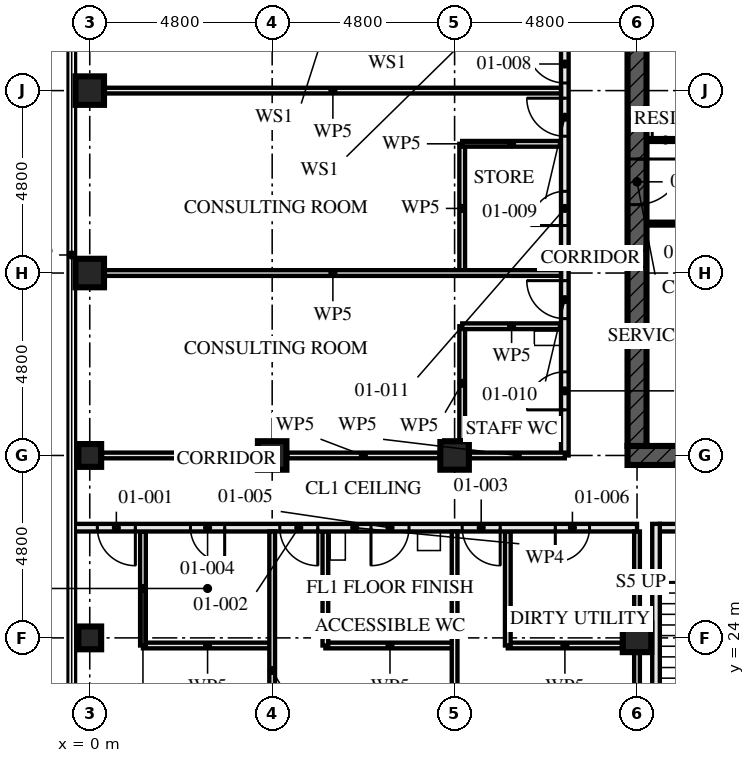
"""IFC4 building model, lengths in metres.
Left out: names, types, materials, properties, quantities, classifications, styles, units other than length and angle.
Written with IfcOpenShell. Run it as: python <this file> out.ifc"""

import sys

from ifc_helpers import new_model, si_unit, direction, frame, frame_2d, origin, origin_2d, place, context, subcontext, project, spatial, rectangle, hollow_rectangle, extrude, element, fill, save


model = new_model("IFC4")
c1 = context("Model", 3, precision=1e-05, world=origin(), true_north=direction((0.0, 1.0)))
c2 = subcontext(c1, "Body", "Model", "MODEL_VIEW")
j1 = project(units=[si_unit("LENGTHUNIT", "METRE"), si_unit("PLANEANGLEUNIT", "RADIAN")], contexts=[c1])
p1 = place(None, origin())
s1 = spatial("IfcSite", under=j1, at=p1, CompositionType="ELEMENT")
p2 = place(p1, origin())
s2 = spatial("IfcBuilding", under=s1, at=p2, CompositionType="ELEMENT")
p3 = place(p2, frame((0.0, 0.0, 4.5)))
s3 = spatial("IfcBuildingStorey", under=s2, at=p3, CompositionType="ELEMENT", Elevation=4.5)
for number, where, z_axis, x_axis in (
    (1, (0.0, 24.0, 0.0), (0.0, 0.0, 1.0), (1.0, 0.0, 0.0)),
    (2, (0.0, 28.8, 0.0), (0.0, 0.0, 1.0), (0.0, 1.0, 0.0)),
):
    element("IfcColumn", number, at=place(p3, frame(where, z_axis=z_axis, x_axis=x_axis)), inside=s3, PredefinedType="COLUMN", context=c2, shape_type="SweptSolid", body=[
        extrude(hollow_rectangle(XDim=0.6, YDim=0.6, WallThickness=0.08, at=origin_2d()), origin(), (0.0, 0.0, 1.0), 4.5),
    ])
for number, where, z_axis, x_axis in (
    (3, (0.0, 33.6, 0.0), (0.0, 0.0, 1.0), (1.0, 0.0, 0.0)),
    (4, (0.0, 38.4, 0.0), (0.0, 0.0, 1.0), (1.0, 0.0, 0.0)),
    (5, (4.8, 28.8, 0.0), (0.0, 0.0, 1.0), (0.0, 1.0, 0.0)),
    (6, (9.6, 28.8, 0.0), (0.0, 0.0, 1.0), (0.0, 1.0, 0.0)),
    (7, (14.4, 24.0, 0.0), (0.0, 0.0, 1.0), (1.0, 0.0, 0.0)),
):
    element("IfcColumn", number, at=place(p3, frame(where, z_axis=z_axis, x_axis=x_axis)), inside=s3, PredefinedType="COLUMN", context=c2, shape_type="SweptSolid", body=[
        extrude(hollow_rectangle(XDim=0.75, YDim=0.75, WallThickness=0.08, at=origin_2d()), origin(), (0.0, 0.0, 1.0), 4.5),
    ])
p4 = place(p3, frame((14.15, 28.8, -0.17), z_axis=(0.0, 0.0, 1.0), x_axis=(1.0, 0.0, 0.0)))
e8 = element("IfcWall", 8, at=p4, inside=s3, PredefinedType="SHEAR", context=c2, shape_type="SweptSolid", body=[
    extrude(rectangle(XDim=14.9, YDim=0.5, at=frame_2d((7.45, 0.0))), origin(), (0.0, 0.0, 1.0), 4.5),
])
p5 = place(p4, frame((6.85, 0.0, 0.17)))
e9 = element("IfcOpeningElement", 9, at=p5, cuts=e8, PredefinedType="OPENING", context=c2, shape_type="SweptSolid", body=[
    extrude(rectangle(XDim=1.2, YDim=2.1, at=frame_2d((0.6, 1.05))), frame((0.0, 0.26, 0.0), z_axis=(0.0, -1.0, 0.0), x_axis=(1.0, 0.0, 0.0)), (0.0, 0.0, 1.0), 0.521),
])
p6 = place(p3, frame((14.4, 42.95, -0.17), z_axis=(0.0, 0.0, 1.0), x_axis=(0.0, -1.0, 0.0)))
e10 = element("IfcWall", 10, at=p6, inside=s3, PredefinedType="SHEAR", context=c2, shape_type="SweptSolid", body=[
    extrude(rectangle(XDim=13.9, YDim=0.5, at=frame_2d((6.95, 0.0))), origin(), (0.0, 0.0, 1.0), 4.5),
])
p7 = place(p6, frame((6.35, 0.0, 0.17)))
e11 = element("IfcOpeningElement", 11, at=p7, cuts=e10, PredefinedType="OPENING", context=c2, shape_type="SweptSolid", body=[
    extrude(rectangle(XDim=1.2, YDim=2.1, at=frame_2d((0.6, 1.05))), frame((0.0, 0.26, 0.0), z_axis=(0.0, -1.0, 0.0), x_axis=(1.0, 0.0, 0.0)), (0.0, 0.0, 1.0), 0.521),
])
p8 = place(p3, frame((1.4, 23.8, 0.0), z_axis=(0.0, 0.0, 1.0), x_axis=(0.0, 1.0, 0.0)))
e12 = element("IfcWall", 12, at=p8, inside=s3, PredefinedType="PARTITIONING", context=c2, shape_type="SweptSolid", body=[
    extrude(rectangle(XDim=3.0, YDim=0.15, at=frame_2d((1.5, 0.0))), origin(), (0.0, 0.0, 1.0), 3.55),
])
p9 = place(p3, frame((1.4, 23.8, 0.0), z_axis=(0.0, 0.0, 1.0), x_axis=(1.0, 0.0, 0.0)))
e13 = element("IfcWall", 13, at=p9, inside=s3, PredefinedType="PARTITIONING", context=c2, shape_type="SweptSolid", body=[
    extrude(rectangle(XDim=3.4, YDim=0.15, at=frame_2d((1.7, 0.0))), origin(), (0.0, 0.0, 1.0), 4.33),
])
p10 = place(p3, frame((6.2, 23.8, 0.0), z_axis=(0.0, 0.0, 1.0), x_axis=(0.0, 1.0, 0.0)))
e14 = element("IfcWall", 14, at=p10, inside=s3, PredefinedType="PARTITIONING", context=c2, shape_type="SweptSolid", body=[
    extrude(rectangle(XDim=3.0, YDim=0.15, at=frame_2d((1.5, 0.0))), origin(), (0.0, 0.0, 1.0), 3.55),
])
p11 = place(p3, frame((6.2, 23.8, 0.0), z_axis=(0.0, 0.0, 1.0), x_axis=(1.0, 0.0, 0.0)))
e15 = element("IfcWall", 15, at=p11, inside=s3, PredefinedType="PARTITIONING", context=c2, shape_type="SweptSolid", body=[
    extrude(rectangle(XDim=3.4, YDim=0.15, at=frame_2d((1.7, 0.0))), origin(), (0.0, 0.0, 1.0), 4.33),
])
p12 = place(p3, frame((11.0, 23.8, 0.0), z_axis=(0.0, 0.0, 1.0), x_axis=(0.0, 1.0, 0.0)))
e16 = element("IfcWall", 16, at=p12, inside=s3, PredefinedType="PARTITIONING", context=c2, shape_type="SweptSolid", body=[
    extrude(rectangle(XDim=3.0, YDim=0.15, at=frame_2d((1.5, 0.0))), origin(), (0.0, 0.0, 1.0), 3.55),
])
p13 = place(p3, frame((11.0, 23.8, 0.0), z_axis=(0.0, 0.0, 1.0), x_axis=(1.0, 0.0, 0.0)))
e17 = element("IfcWall", 17, at=p13, inside=s3, PredefinedType="PARTITIONING", context=c2, shape_type="SweptSolid", body=[
    extrude(rectangle(XDim=3.005, YDim=0.15, at=frame_2d((1.502, 0.0))), origin(), (0.0, 0.0, 1.0), 4.33),
])
p14 = place(p3, frame((4.8, 19.486, 0.0), z_axis=(0.0, 0.0, 1.0), x_axis=(0.0, 1.0, 0.0)))
e18 = element("IfcWall", 18, at=p14, inside=s3, PredefinedType="PARTITIONING", context=c2, shape_type="SweptSolid", body=[
    extrude(rectangle(XDim=7.314, YDim=0.15, at=frame_2d((3.657, 0.0))), origin(), (0.0, 0.0, 1.0), 3.55),
])
p15 = place(p3, frame((9.6, 14.686, 0.0), z_axis=(0.0, 0.0, 1.0), x_axis=(0.0, 1.0, 0.0)))
e19 = element("IfcWall", 19, at=p15, inside=s3, PredefinedType="PARTITIONING", context=c2, shape_type="SweptSolid", body=[
    extrude(rectangle(XDim=12.115, YDim=0.15, at=frame_2d((6.057, 0.0))), origin(), (0.0, 0.0, 1.0), 3.55),
])
p16 = place(p3, frame((-0.455, 26.9, 0.0), z_axis=(0.0, 0.0, 1.0), x_axis=(1.0, 0.0, 0.0)))
e20 = element("IfcWall", 20, at=p16, inside=s3, PredefinedType="PARTITIONING", context=c2, shape_type="SweptSolid", body=[
    extrude(rectangle(XDim=14.855, YDim=0.2, at=frame_2d((7.427, 0.0))), origin(), (0.0, 0.0, 1.0), 3.32),
])
p17 = place(p16, frame((0.655, 0.0, 0.0)))
e21 = element("IfcOpeningElement", 21, at=p17, cuts=e20, PredefinedType="OPENING", context=c2, shape_type="SweptSolid", body=[
    extrude(rectangle(XDim=1.0, YDim=2.4, at=frame_2d((0.5, 1.2))), frame((0.0, 0.111, 0.0), z_axis=(0.0, -1.0, 0.0), x_axis=(1.0, 0.0, 0.0)), (0.0, 0.0, 1.0), 0.221),
])
p18 = place(p16, frame((5.455, 0.0, 0.0)))
e22 = element("IfcOpeningElement", 22, at=p18, cuts=e20, PredefinedType="OPENING", context=c2, shape_type="SweptSolid", body=[
    extrude(rectangle(XDim=1.0, YDim=2.4, at=frame_2d((0.5, 1.2))), frame((0.0, 0.111, 0.0), z_axis=(0.0, -1.0, 0.0), x_axis=(1.0, 0.0, 0.0)), (0.0, 0.0, 1.0), 0.221),
])
p19 = place(p16, frame((10.255, 0.0, 0.0)))
e23 = element("IfcOpeningElement", 23, at=p19, cuts=e20, PredefinedType="OPENING", context=c2, shape_type="SweptSolid", body=[
    extrude(rectangle(XDim=1.0, YDim=2.4, at=frame_2d((0.5, 1.2))), frame((0.0, 0.111, 0.0), z_axis=(0.0, -1.0, 0.0), x_axis=(1.0, 0.0, 0.0)), (0.0, 0.0, 1.0), 0.221),
])
p20 = place(p16, frame((3.105, 0.0, 0.0)))
e24 = element("IfcOpeningElement", 24, at=p20, cuts=e20, PredefinedType="OPENING", context=c2, shape_type="SweptSolid", body=[
    extrude(rectangle(XDim=0.9, YDim=2.1, at=frame_2d((0.45, 1.05))), frame((0.0, 0.111, 0.0), z_axis=(0.0, -1.0, 0.0), x_axis=(1.0, 0.0, 0.0)), (0.0, 0.0, 1.0), 0.221),
])
p21 = place(p16, frame((7.855, 0.0, 0.0)))
e25 = element("IfcOpeningElement", 25, at=p21, cuts=e20, PredefinedType="OPENING", context=c2, shape_type="SweptSolid", body=[
    extrude(rectangle(XDim=1.0, YDim=2.1, at=frame_2d((0.5, 1.05))), frame((0.0, 0.111, 0.0), z_axis=(0.0, -1.0, 0.0), x_axis=(1.0, 0.0, 0.0)), (0.0, 0.0, 1.0), 0.221),
])
p22 = place(p16, frame((12.705, 0.0, 0.0)))
e26 = element("IfcOpeningElement", 26, at=p22, cuts=e20, PredefinedType="OPENING", context=c2, shape_type="SweptSolid", body=[
    extrude(rectangle(XDim=0.9, YDim=2.1, at=frame_2d((0.45, 1.05))), frame((0.0, 0.111, 0.0), z_axis=(0.0, -1.0, 0.0), x_axis=(1.0, 0.0, 0.0)), (0.0, 0.0, 1.0), 0.221),
])
p23 = place(p3, frame((9.8, 37.0, 0.0), z_axis=(0.0, 0.0, 1.0), x_axis=(1.0, 0.0, 0.0)))
e27 = element("IfcWall", 27, at=p23, inside=s3, PredefinedType="PARTITIONING", context=c2, shape_type="SweptSolid", body=[
    extrude(rectangle(XDim=2.6, YDim=0.15, at=frame_2d((1.3, 0.0))), origin(), (0.0, 0.0, 1.0), 4.33),
])
p24 = place(p3, frame((9.8, 37.0, 0.0), z_axis=(0.0, 0.0, 1.0), x_axis=(0.0, -1.0, 0.0)))
e28 = element("IfcWall", 28, at=p24, inside=s3, PredefinedType="PARTITIONING", context=c2, shape_type="SweptSolid", body=[
    extrude(rectangle(XDim=3.4, YDim=0.15, at=frame_2d((1.7, 0.0))), origin(), (0.0, 0.0, 1.0), 4.33),
])
p25 = place(p3, frame((9.8, 32.2, 0.0), z_axis=(0.0, 0.0, 1.0), x_axis=(1.0, 0.0, 0.0)))
e29 = element("IfcWall", 29, at=p25, inside=s3, PredefinedType="PARTITIONING", context=c2, shape_type="SweptSolid", body=[
    extrude(rectangle(XDim=2.6, YDim=0.15, at=frame_2d((1.3, 0.0))), origin(), (0.0, 0.0, 1.0), 4.33),
])
p26 = place(p3, frame((9.8, 32.2, 0.0), z_axis=(0.0, 0.0, 1.0), x_axis=(0.0, -1.0, 0.0)))
e30 = element("IfcWall", 30, at=p26, inside=s3, PredefinedType="PARTITIONING", context=c2, shape_type="SweptSolid", body=[
    extrude(rectangle(XDim=3.005, YDim=0.15, at=frame_2d((1.502, 0.0))), origin(), (0.0, 0.0, 1.0), 4.33),
])
for number, where, z_axis, x_axis in (
    (31, (0.395, 38.4, 0.0), (0.0, 0.0, 1.0), (1.0, 0.0, 0.0)),
    (32, (0.395, 33.6, 0.0), (0.0, 0.0, 1.0), (1.0, 0.0, 0.0)),
):
    element("IfcWall", number, at=place(p3, frame(where, z_axis=z_axis, x_axis=x_axis)), inside=s3, PredefinedType="PARTITIONING", context=c2, shape_type="SweptSolid", body=[
        extrude(rectangle(XDim=12.005, YDim=0.15, at=frame_2d((6.002, 0.0))), origin(), (0.0, 0.0, 1.0), 3.55),
    ])
p27 = place(p3, frame((12.5, 43.2, 0.0), z_axis=(0.0, 0.0, 1.0), x_axis=(0.0, -1.0, 0.0)))
e33 = element("IfcWall", 33, at=p27, inside=s3, PredefinedType="PARTITIONING", context=c2, shape_type="SweptSolid", body=[
    extrude(rectangle(XDim=14.4, YDim=0.2, at=frame_2d((7.2, 0.0))), origin(), (0.0, 0.0, 1.0), 3.55),
])
p28 = place(p27, frame((1.4, 0.0, 0.0)))
e34 = element("IfcOpeningElement", 34, at=p28, cuts=e33, PredefinedType="OPENING", context=c2, shape_type="SweptSolid", body=[
    extrude(rectangle(XDim=1.0, YDim=2.1, at=frame_2d((0.5, 1.05))), frame((0.0, 0.111, 0.0), z_axis=(0.0, -1.0, 0.0), x_axis=(1.0, 0.0, 0.0)), (0.0, 0.0, 1.0), 0.221),
])
p29 = place(p27, frame((3.6, 0.0, 0.0)))
e35 = element("IfcOpeningElement", 35, at=p29, cuts=e33, PredefinedType="OPENING", context=c2, shape_type="SweptSolid", body=[
    extrude(rectangle(XDim=1.0, YDim=2.4, at=frame_2d((0.5, 1.2))), frame((0.0, 0.111, 0.0), z_axis=(0.0, -1.0, 0.0), x_axis=(1.0, 0.0, 0.0)), (0.0, 0.0, 1.0), 0.221),
])
p30 = place(p27, frame((5.0, 0.0, 0.0)))
e36 = element("IfcOpeningElement", 36, at=p30, cuts=e33, PredefinedType="OPENING", context=c2, shape_type="SweptSolid", body=[
    extrude(rectangle(XDim=1.0, YDim=2.4, at=frame_2d((0.5, 1.2))), frame((0.0, 0.111, 0.0), z_axis=(0.0, -1.0, 0.0), x_axis=(1.0, 0.0, 0.0)), (0.0, 0.0, 1.0), 0.221),
])
p31 = place(p27, frame((9.8, 0.0, 0.0)))
e37 = element("IfcOpeningElement", 37, at=p31, cuts=e33, PredefinedType="OPENING", context=c2, shape_type="SweptSolid", body=[
    extrude(rectangle(XDim=1.0, YDim=2.4, at=frame_2d((0.5, 1.2))), frame((0.0, 0.111, 0.0), z_axis=(0.0, -1.0, 0.0), x_axis=(1.0, 0.0, 0.0)), (0.0, 0.0, 1.0), 0.221),
])
p32 = place(p27, frame((7.45, 0.0, 0.0)))
e38 = element("IfcOpeningElement", 38, at=p32, cuts=e33, PredefinedType="OPENING", context=c2, shape_type="SweptSolid", body=[
    extrude(rectangle(XDim=0.9, YDim=2.1, at=frame_2d((0.45, 1.05))), frame((0.0, 0.111, 0.0), z_axis=(0.0, -1.0, 0.0), x_axis=(1.0, 0.0, 0.0)), (0.0, 0.0, 1.0), 0.221),
])
p33 = place(p27, frame((12.2, 0.0, 0.0)))
e39 = element("IfcOpeningElement", 39, at=p33, cuts=e33, PredefinedType="OPENING", context=c2, shape_type="SweptSolid", body=[
    extrude(rectangle(XDim=1.0, YDim=2.1, at=frame_2d((0.5, 1.05))), frame((0.0, 0.111, 0.0), z_axis=(0.0, -1.0, 0.0), x_axis=(1.0, 0.0, 0.0)), (0.0, 0.0, 1.0), 0.221),
])
p34 = place(p3, frame((14.9, 22.1, 0.0), z_axis=(0.0, 0.0, 1.0), x_axis=(0.0, 1.0, 0.0)))
e40 = element("IfcWall", 40, at=p34, inside=s3, PredefinedType="SOLIDWALL", context=c2, shape_type="SweptSolid", body=[
    extrude(rectangle(XDim=4.9, YDim=0.2, at=frame_2d((2.45, 0.0))), origin(), (0.0, 0.0, 1.0), 3.99),
])
p35 = place(p3, frame((15.0, 26.9, 0.0), z_axis=(0.0, 0.0, 1.0), x_axis=(1.0, 0.0, 0.0)))
e41 = element("IfcWall", 41, at=p35, inside=s3, PredefinedType="SOLIDWALL", context=c2, shape_type="SweptSolid", body=[
    extrude(rectangle(XDim=2.6, YDim=0.2, at=frame_2d((1.3, 0.0))), origin(), (0.0, 0.0, 1.0), 4.33),
])
p36 = place(p35, frame((0.8, 0.0, 0.0)))
e42 = element("IfcOpeningElement", 42, at=p36, cuts=e41, PredefinedType="OPENING", context=c2, shape_type="SweptSolid", body=[
    extrude(rectangle(XDim=1.0, YDim=2.1, at=frame_2d((0.5, 1.05))), frame((0.0, 0.111, 0.0), z_axis=(0.0, -1.0, 0.0), x_axis=(1.0, 0.0, 0.0)), (0.0, 0.0, 1.0), 0.221),
])
p37 = place(p3, frame((14.65, 34.9, 0.0), z_axis=(0.0, 0.0, 1.0), x_axis=(1.0, 0.0, 0.0)))
e43 = element("IfcWall", 43, at=p37, inside=s3, PredefinedType="SOLIDWALL", context=c2, shape_type="SweptSolid", body=[
    extrude(rectangle(XDim=5.9, YDim=0.1, at=frame_2d((2.95, 0.0))), origin(), (0.0, 0.0, 1.0), 4.33),
])
p38 = place(p37, frame((1.6, 0.0, 0.0)))
e44 = element("IfcOpeningElement", 44, at=p38, cuts=e43, PredefinedType="OPENING", context=c2, shape_type="SweptSolid", body=[
    extrude(rectangle(XDim=0.7, YDim=2.1, at=frame_2d((0.35, 1.05))), frame((0.0, 0.061, 0.0), z_axis=(0.0, -1.0, 0.0), x_axis=(1.0, 0.0, 0.0)), (0.0, 0.0, 1.0), 0.121),
])
p39 = place(p3, frame((14.65, 37.1, 0.0), z_axis=(0.0, 0.0, 1.0), x_axis=(1.0, 0.0, 0.0)))
e45 = element("IfcWall", 45, at=p39, inside=s3, PredefinedType="SOLIDWALL", context=c2, shape_type="SweptSolid", body=[
    extrude(rectangle(XDim=5.9, YDim=0.1, at=frame_2d((2.95, 0.0))), origin(), (0.0, 0.0, 1.0), 4.33),
])
p40 = place(p39, frame((0.15, 0.0, 0.0)))
e46 = element("IfcOpeningElement", 46, at=p40, cuts=e45, PredefinedType="OPENING", context=c2, shape_type="SweptSolid", body=[
    extrude(rectangle(XDim=0.7, YDim=2.1, at=frame_2d((0.35, 1.05))), frame((0.0, 0.061, 0.0), z_axis=(0.0, -1.0, 0.0), x_axis=(1.0, 0.0, 0.0)), (0.0, 0.0, 1.0), 0.121),
])
p41 = place(p39, frame((1.5, 0.0, 0.0)))
e47 = element("IfcOpeningElement", 47, at=p41, cuts=e45, PredefinedType="OPENING", context=c2, shape_type="SweptSolid", body=[
    extrude(rectangle(XDim=0.9, YDim=2.1, at=frame_2d((0.45, 1.05))), frame((0.0, 0.061, 0.0), z_axis=(0.0, -1.0, 0.0), x_axis=(1.0, 0.0, 0.0)), (0.0, 0.0, 1.0), 0.121),
])
p42 = place(p3, frame((12.5, 28.8, 0.0), z_axis=(0.0, 0.0, 1.0), x_axis=(-1.0, 0.0, 0.0)))
e48 = element("IfcWall", 48, at=p42, inside=s3, PredefinedType="PARTITIONING", context=c2, shape_type="SweptSolid", body=[
    extrude(rectangle(XDim=2.505, YDim=0.15, at=frame_2d((1.252, 0.0))), origin(), (0.0, 0.0, 1.0), 3.32),
])
p43 = place(p3, frame((9.205, 28.8, 0.0), z_axis=(0.0, 0.0, 1.0), x_axis=(-1.0, 0.0, 0.0)))
e49 = element("IfcWall", 49, at=p43, inside=s3, PredefinedType="PARTITIONING", context=c2, shape_type="SweptSolid", body=[
    extrude(rectangle(XDim=4.01, YDim=0.15, at=frame_2d((2.005, 0.0))), origin(), (0.0, 0.0, 1.0), 3.32),
])
p44 = place(p3, frame((4.405, 28.8, 0.0), z_axis=(0.0, 0.0, 1.0), x_axis=(-1.0, 0.0, 0.0)))
e50 = element("IfcWall", 50, at=p44, inside=s3, PredefinedType="PARTITIONING", context=c2, shape_type="SweptSolid", body=[
    extrude(rectangle(XDim=4.085, YDim=0.15, at=frame_2d((2.042, 0.0))), origin(), (0.0, 0.0, 1.0), 3.32),
])
p45 = place(p3, frame((14.4, 19.595, 0.0), z_axis=(0.0, 0.0, 1.0), x_axis=(0.0, 1.0, 0.0)))
e51 = element("IfcWall", 51, at=p45, inside=s3, PredefinedType="PARTITIONING", context=c2, shape_type="SweptSolid", body=[
    extrude(rectangle(XDim=4.01, YDim=0.15, at=frame_2d((2.005, 0.0))), origin(), (0.0, 0.0, 1.0), 3.32),
])
p46 = place(p3, frame((14.4, 24.395, 0.0), z_axis=(0.0, 0.0, 1.0), x_axis=(0.0, 1.0, 0.0)))
e52 = element("IfcWall", 52, at=p46, inside=s3, PredefinedType="PARTITIONING", context=c2, shape_type="SweptSolid", body=[
    extrude(rectangle(XDim=2.405, YDim=0.15, at=frame_2d((1.203, 0.0))), origin(), (0.0, 0.0, 1.0), 3.32),
])
p47 = place(p17, frame((1.0, 0.0, 0.0), z_axis=(0.0, 0.0, 1.0), x_axis=(-1.0, 0.0, 0.0)))
e53 = element("IfcDoor", 53, at=p47, inside=s3, OperationType="SINGLE_SWING_RIGHT", PredefinedType="DOOR", context=c2, shape_type="SweptSolid", body=[
    extrude(rectangle(XDim=1.0, YDim=2.4, at=frame_2d((0.5, 1.2))), frame((0.0, 0.027, 0.0), z_axis=(0.0, -1.0, 0.0), x_axis=(1.0, 0.0, 0.0)), (0.0, 0.0, 1.0), 0.054),
])
fill(e21, e53)
p48 = place(p18, frame((1.0, 0.0, 0.0), z_axis=(0.0, 0.0, 1.0), x_axis=(-1.0, 0.0, 0.0)))
e54 = element("IfcDoor", 54, at=p48, inside=s3, OperationType="SINGLE_SWING_RIGHT", PredefinedType="DOOR", context=c2, shape_type="SweptSolid", body=[
    extrude(rectangle(XDim=1.0, YDim=2.4, at=frame_2d((0.5, 1.2))), frame((0.0, 0.027, 0.0), z_axis=(0.0, -1.0, 0.0), x_axis=(1.0, 0.0, 0.0)), (0.0, 0.0, 1.0), 0.054),
])
fill(e22, e54)
p49 = place(p19, frame((1.0, 0.0, 0.0), z_axis=(0.0, 0.0, 1.0), x_axis=(-1.0, 0.0, 0.0)))
e55 = element("IfcDoor", 55, at=p49, inside=s3, OperationType="SINGLE_SWING_RIGHT", PredefinedType="DOOR", context=c2, shape_type="SweptSolid", body=[
    extrude(rectangle(XDim=1.0, YDim=2.4, at=frame_2d((0.5, 1.2))), frame((0.0, 0.027, 0.0), z_axis=(0.0, -1.0, 0.0), x_axis=(1.0, 0.0, 0.0)), (0.0, 0.0, 1.0), 0.054),
])
fill(e23, e55)
p50 = place(p20, frame((0.9, 0.0, 0.0), z_axis=(0.0, 0.0, 1.0), x_axis=(-1.0, 0.0, 0.0)))
e56 = element("IfcDoor", 56, at=p50, inside=s3, OperationType="SINGLE_SWING_RIGHT", PredefinedType="DOOR", context=c2, shape_type="SweptSolid", body=[
    extrude(rectangle(XDim=0.9, YDim=2.1, at=frame_2d((0.45, 1.05))), frame((0.0, 0.027, 0.0), z_axis=(0.0, -1.0, 0.0), x_axis=(1.0, 0.0, 0.0)), (0.0, 0.0, 1.0), 0.054),
])
fill(e24, e56)
p51 = place(p21, frame((1.0, 0.0, 0.0), z_axis=(0.0, 0.0, 1.0), x_axis=(-1.0, 0.0, 0.0)))
e57 = element("IfcDoor", 57, at=p51, inside=s3, OperationType="SINGLE_SWING_LEFT", PredefinedType="DOOR", context=c2, shape_type="SweptSolid", body=[
    extrude(rectangle(XDim=1.0, YDim=2.1, at=frame_2d((0.5, 1.05))), frame((0.0, 0.027, 0.0), z_axis=(0.0, -1.0, 0.0), x_axis=(1.0, 0.0, 0.0)), (0.0, 0.0, 1.0), 0.054),
])
fill(e25, e57)
p52 = place(p22, frame((0.9, 0.0, 0.0), z_axis=(0.0, 0.0, 1.0), x_axis=(-1.0, 0.0, 0.0)))
e58 = element("IfcDoor", 58, at=p52, inside=s3, OperationType="SINGLE_SWING_LEFT", PredefinedType="DOOR", context=c2, shape_type="SweptSolid", body=[
    extrude(rectangle(XDim=0.9, YDim=2.1, at=frame_2d((0.45, 1.05))), frame((0.0, 0.027, 0.0), z_axis=(0.0, -1.0, 0.0), x_axis=(1.0, 0.0, 0.0)), (0.0, 0.0, 1.0), 0.054),
])
fill(e26, e58)
p53 = place(p29, frame((1.0, 0.0, 0.0), z_axis=(0.0, 0.0, 1.0), x_axis=(-1.0, 0.0, 0.0)))
e59 = element("IfcDoor", 59, at=p53, inside=s3, OperationType="SINGLE_SWING_LEFT", PredefinedType="DOOR", context=c2, shape_type="SweptSolid", body=[
    extrude(rectangle(XDim=1.0, YDim=2.4, at=frame_2d((0.5, 1.2))), frame((0.0, 0.027, 0.0), z_axis=(0.0, -1.0, 0.0), x_axis=(1.0, 0.0, 0.0)), (0.0, 0.0, 1.0), 0.054),
])
fill(e35, e59)
p54 = place(p30, frame((1.0, 0.0, 0.0), z_axis=(0.0, 0.0, 1.0), x_axis=(-1.0, 0.0, 0.0)))
e60 = element("IfcDoor", 60, at=p54, inside=s3, OperationType="SINGLE_SWING_LEFT", PredefinedType="DOOR", context=c2, shape_type="SweptSolid", body=[
    extrude(rectangle(XDim=1.0, YDim=2.4, at=frame_2d((0.5, 1.2))), frame((0.0, 0.027, 0.0), z_axis=(0.0, -1.0, 0.0), x_axis=(1.0, 0.0, 0.0)), (0.0, 0.0, 1.0), 0.054),
])
fill(e36, e60)
p55 = place(p31, frame((1.0, 0.0, 0.0), z_axis=(0.0, 0.0, 1.0), x_axis=(-1.0, 0.0, 0.0)))
e61 = element("IfcDoor", 61, at=p55, inside=s3, OperationType="SINGLE_SWING_LEFT", PredefinedType="DOOR", context=c2, shape_type="SweptSolid", body=[
    extrude(rectangle(XDim=1.0, YDim=2.4, at=frame_2d((0.5, 1.2))), frame((0.0, 0.027, 0.0), z_axis=(0.0, -1.0, 0.0), x_axis=(1.0, 0.0, 0.0)), (0.0, 0.0, 1.0), 0.054),
])
fill(e37, e61)
p56 = place(p32, frame((0.9, 0.0, 0.0), z_axis=(0.0, 0.0, 1.0), x_axis=(-1.0, 0.0, 0.0)))
e62 = element("IfcDoor", 62, at=p56, inside=s3, OperationType="SINGLE_SWING_RIGHT", PredefinedType="DOOR", context=c2, shape_type="SweptSolid", body=[
    extrude(rectangle(XDim=0.9, YDim=2.1, at=frame_2d((0.45, 1.05))), frame((0.0, 0.027, 0.0), z_axis=(0.0, -1.0, 0.0), x_axis=(1.0, 0.0, 0.0)), (0.0, 0.0, 1.0), 0.054),
])
fill(e38, e62)
p57 = place(p33, frame((1.0, 0.0, 0.0), z_axis=(0.0, 0.0, 1.0), x_axis=(-1.0, 0.0, 0.0)))
e63 = element("IfcDoor", 63, at=p57, inside=s3, OperationType="SINGLE_SWING_RIGHT", PredefinedType="DOOR", context=c2, shape_type="SweptSolid", body=[
    extrude(rectangle(XDim=1.0, YDim=2.1, at=frame_2d((0.5, 1.05))), frame((0.0, 0.027, 0.0), z_axis=(0.0, -1.0, 0.0), x_axis=(1.0, 0.0, 0.0)), (0.0, 0.0, 1.0), 0.054),
])
fill(e39, e63)
p58 = place(p40, origin())
e64 = element("IfcDoor", 64, at=p58, inside=s3, OperationType="SINGLE_SWING_RIGHT", PredefinedType="DOOR", context=c2, shape_type="SweptSolid", body=[
    extrude(rectangle(XDim=0.7, YDim=2.1, at=frame_2d((0.35, 1.05))), frame((0.0, 0.027, 0.0), z_axis=(0.0, -1.0, 0.0), x_axis=(1.0, 0.0, 0.0)), (0.0, 0.0, 1.0), 0.054),
])
fill(e46, e64)
p59 = place(p7, origin())
e65 = element("IfcDoor", 65, at=p59, inside=s3, OperationType="SINGLE_SWING_LEFT", PredefinedType="DOOR", context=c2, shape_type="SweptSolid", body=[
    extrude(rectangle(XDim=1.2, YDim=2.1, at=frame_2d((0.6, 1.05))), frame((0.0, 0.027, 0.0), z_axis=(0.0, -1.0, 0.0), x_axis=(1.0, 0.0, 0.0)), (0.0, 0.0, 1.0), 0.054),
])
fill(e11, e65)
save(model, sys.argv[1])
